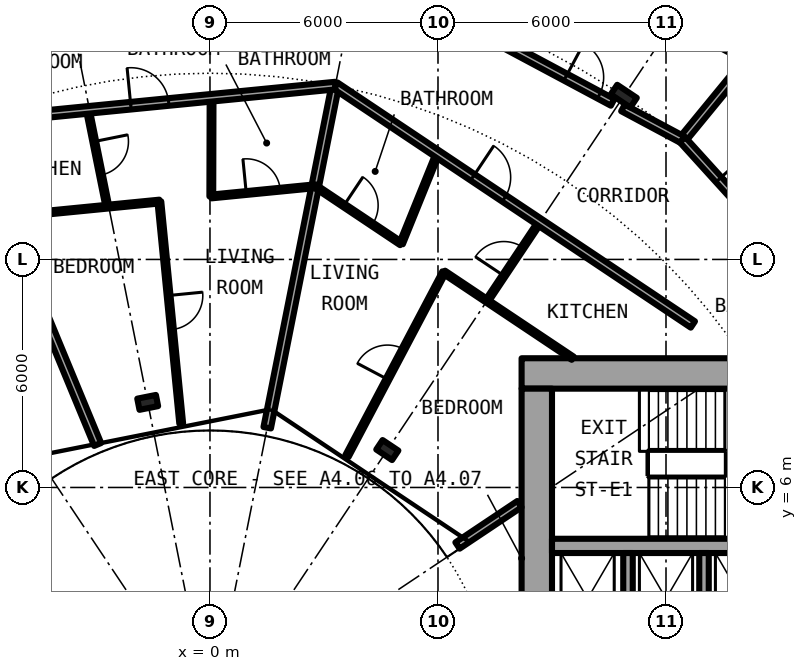
"""IFC4 building model, lengths in metres.
Left out: names, types, materials, properties, quantities, classifications, styles, units other than length and angle.
Written with IfcOpenShell. Run it as: python <this file> out.ifc"""

import sys

from ifc_helpers import new_model, si_unit, direction, frame, frame_2d, origin, origin_2d, place, context, subcontext, project, spatial, rectangle, i_section, extrude, element, fill, save


model = new_model("IFC4")
c1 = context("Model", 3, precision=1e-05, world=origin(), true_north=direction((0.0, 1.0)))
c2 = subcontext(c1, "Body", "Model", "MODEL_VIEW")
j1 = project(units=[si_unit("LENGTHUNIT", "METRE"), si_unit("PLANEANGLEUNIT", "RADIAN")], contexts=[c1])
p1 = place(None, origin())
s1 = spatial("IfcSite", under=j1, at=p1, CompositionType="ELEMENT")
p2 = place(p1, origin())
s2 = spatial("IfcBuilding", under=s1, at=p2, CompositionType="ELEMENT")
p3 = place(p2, frame((0.0, 0.0, 22.8)))
s3 = spatial("IfcBuildingStorey", under=s2, at=p3, CompositionType="ELEMENT", Elevation=22.8)
p4 = place(p3, frame((10.889, 16.297, 0.0), z_axis=(0.0, 0.0, 1.0), x_axis=(0.55557023302, 0.831469612303, 0.0)))
e1 = element("IfcColumn", 1, at=p4, inside=s3, PredefinedType="COLUMN", context=c2, shape_type="SweptSolid", body=[
    extrude(i_section(OverallWidth=0.305, OverallDepth=0.62, WebThickness=0.021, FlangeThickness=0.04, FilletRadius=0.027, at=origin_2d()), origin(), (0.0, 0.0, 1.0), 3.05),
])
for number, where, z_axis, x_axis in (
    (2, (4.667, 6.984, 0.0), (0.0, 0.0, 1.0), (0.556, 0.831, 0.0)),
    (3, (-1.639, 8.239, 0.0), (0.0, 0.0, 1.0), (-0.195, 0.981, 0.0)),
):
    element("IfcColumn", number, at=place(p3, frame(where, z_axis=z_axis, x_axis=x_axis)), inside=s3, PredefinedType="COLUMN", context=c2, shape_type="SweptSolid", body=[
        extrude(i_section(OverallWidth=0.3, OverallDepth=0.5, WebThickness=0.014, FlangeThickness=0.028, FilletRadius=0.027, at=origin_2d()), origin(), (0.0, 0.0, 1.0), 3.05),
    ])
p5 = place(p3, frame((22.4, 9.0, 0.0), z_axis=(0.0, 0.0, 1.0), x_axis=(-1.0, 0.0, 0.0)))
e4 = element("IfcWall", 4, at=p5, inside=s3, PredefinedType="SHEAR", context=c2, shape_type="SweptSolid", body=[
    extrude(rectangle(XDim=14.2, YDim=0.8, at=frame_2d((7.1, 0.0))), origin(), (0.0, 0.0, 1.0), 3.05),
])
p6 = place(p5, frame((1.325, 0.0, 0.0)))
e5 = element("IfcOpeningElement", 5, at=p6, cuts=e4, PredefinedType="OPENING", context=c2, shape_type="SweptSolid", body=[
    extrude(rectangle(XDim=1.2, YDim=2.3, at=frame_2d((0.6, 1.15))), frame((0.0, 0.41, 0.0), z_axis=(0.0, -1.0, 0.0), x_axis=(1.0, 0.0, 0.0)), (0.0, 0.0, 1.0), 0.82),
])
p7 = place(p3, frame((8.6, -8.6, 0.0), z_axis=(0.0, 0.0, 1.0), x_axis=(0.0, 1.0, 0.0)))
e6 = element("IfcWall", 6, at=p7, inside=s3, PredefinedType="SHEAR", context=c2, shape_type="SweptSolid", body=[
    extrude(rectangle(XDim=17.2, YDim=0.8, at=frame_2d((8.6, 0.0))), origin(), (0.0, 0.0, 1.0), 3.05),
])
p8 = place(p7, frame((7.4, 0.0, 0.1)))
e7 = element("IfcOpeningElement", 7, at=p8, cuts=e6, PredefinedType="OPENING", context=c2, shape_type="SweptSolid", body=[
    extrude(rectangle(XDim=2.4, YDim=2.2, at=frame_2d((1.2, 1.1))), frame((0.0, 0.41, 0.0), z_axis=(0.0, -1.0, 0.0), x_axis=(1.0, 0.0, 0.0)), (0.0, 0.0, 1.0), 0.82),
])
p9 = place(p3, frame((9.0, 4.462, 0.0), z_axis=(0.0, 0.0, 1.0), x_axis=(1.0, 0.0, 0.0)))
e8 = element("IfcWall", 8, at=p9, inside=s3, PredefinedType="SHEAR", context=c2, shape_type="SweptSolid", body=[
    extrude(rectangle(XDim=10.15, YDim=0.375, at=frame_2d((5.075, 0.0))), origin(), (0.0, 0.0, 1.0), 3.05),
])
p10 = place(p9, frame((6.6, 0.0, 0.0)))
e9 = element("IfcOpeningElement", 9, at=p10, cuts=e8, PredefinedType="OPENING", context=c2, shape_type="SweptSolid", body=[
    extrude(rectangle(XDim=1.1, YDim=2.3, at=frame_2d((0.55, 1.15))), frame((0.0, 0.198, 0.0), z_axis=(0.0, -1.0, 0.0), x_axis=(1.0, 0.0, 0.0)), (0.0, 0.0, 1.0), 0.395),
])
for number, where, z_axis, x_axis in (
    (10, (11.0, 1.825, 0.0), (0.0, 0.0, 1.0), (0.0, 1.0, 0.0)),
    (11, (13.0, 1.825, 0.0), (0.0, 0.0, 1.0), (0.0, 1.0, 0.0)),
):
    element("IfcWall", number, at=place(p3, frame(where, z_axis=z_axis, x_axis=x_axis)), inside=s3, PredefinedType="SOLIDWALL", context=c2, shape_type="SweptSolid", body=[
        extrude(rectangle(XDim=2.45, YDim=0.25, at=frame_2d((1.225, 0.0))), origin(), (0.0, 0.0, 1.0), 2.7),
    ])
p11 = place(p3, frame((-6.468, 15.614, 0.0), z_axis=(0.0, 0.0, 1.0), x_axis=(0.382518543471, -0.92394781449, 0.0)))
e12 = element("IfcWall", 12, at=p11, inside=s3, PredefinedType="PARTITIONING", context=c2, shape_type="SweptSolid", body=[
    extrude(rectangle(XDim=9.181, YDim=0.2, at=frame_2d((4.591, 0.0))), origin(), (0.0, 0.0, 1.0), 2.7),
])
p12 = place(p3, frame((-3.213, 15.934, 0.0), z_axis=(0.0, 0.0, 1.0), x_axis=(0.197851046463, -0.980232096706, 0.0)))
e13 = element("IfcWall", 13, at=p12, inside=s3, PredefinedType="PARTITIONING", context=c2, shape_type="SweptSolid", body=[
    extrude(rectangle(XDim=2.597, YDim=0.1, at=frame_2d((1.299, 0.0))), origin(), (0.0, 0.0, 1.0), 2.7),
])
p13 = place(p12, frame((0.849, 0.0, 0.0)))
e14 = element("IfcOpeningElement", 14, at=p13, cuts=e13, PredefinedType="OPENING", context=c2, shape_type="SweptSolid", body=[
    extrude(rectangle(XDim=0.9, YDim=2.3, at=frame_2d((0.45, 1.15))), frame((0.0, 0.06, 0.0), z_axis=(0.0, -1.0, 0.0), x_axis=(1.0, 0.0, 0.0)), (0.0, 0.0, 1.0), 0.12),
])
p14 = place(p3, frame((-1.332, 13.523, 0.0), z_axis=(0.0, 0.0, 1.0), x_axis=(0.097979463572, -0.995188436789, 0.0)))
e15 = element("IfcWall", 15, at=p14, inside=s3, PredefinedType="PARTITIONING", context=c2, shape_type="SweptSolid", body=[
    extrude(rectangle(XDim=5.868, YDim=0.1, at=frame_2d((2.934, 0.0))), origin(), (0.0, 0.0, 1.0), 2.7),
])
p15 = place(p14, frame((2.484, 0.0, 0.0)))
e16 = element("IfcOpeningElement", 16, at=p15, cuts=e15, PredefinedType="OPENING", context=c2, shape_type="SweptSolid", body=[
    extrude(rectangle(XDim=0.9, YDim=2.3, at=frame_2d((0.45, 1.15))), frame((0.0, 0.06, 0.0), z_axis=(0.0, -1.0, 0.0), x_axis=(1.0, 0.0, 0.0)), (0.0, 0.0, 1.0), 0.12),
])
p16 = place(p3, frame((0.035, 13.658, 0.0), z_axis=(0.0, 0.0, 1.0), x_axis=(0.00272632248, 0.999996283576, 0.0)))
e17 = element("IfcWall", 17, at=p16, inside=s3, PredefinedType="PARTITIONING", context=c2, shape_type="SweptSolid", body=[
    extrude(rectangle(XDim=2.597, YDim=0.1, at=frame_2d((1.298, 0.0))), origin(), (0.0, 0.0, 1.0), 2.7),
])
p17 = place(p3, frame((1.506, 7.572, 0.0), z_axis=(0.0, 0.0, 1.0), x_axis=(0.19511354088, 0.980780661598, 0.0)))
e18 = element("IfcWall", 18, at=p17, inside=s3, PredefinedType="PARTITIONING", context=c2, shape_type="SweptSolid", body=[
    extrude(rectangle(XDim=9.179, YDim=0.2, at=frame_2d((4.59, 0.0))), origin(), (0.0, 0.0, 1.0), 2.7),
])
p18 = place(p3, frame((3.605, 6.827, 0.0), z_axis=(0.0, 0.0, 1.0), x_axis=(0.466976820365, 0.884269556889, 0.0)))
e19 = element("IfcWall", 19, at=p18, inside=s3, PredefinedType="PARTITIONING", context=c2, shape_type="SweptSolid", body=[
    extrude(rectangle(XDim=5.469, YDim=0.1, at=frame_2d((2.735, 0.0))), origin(), (0.0, 0.0, 1.0), 2.7),
])
p19 = place(p18, frame((2.284, 0.0, 0.0)))
e20 = element("IfcOpeningElement", 20, at=p19, cuts=e19, PredefinedType="OPENING", context=c2, shape_type="SweptSolid", body=[
    extrude(rectangle(XDim=0.9, YDim=2.3, at=frame_2d((0.45, 1.15))), frame((0.0, 0.06, 0.0), z_axis=(0.0, -1.0, 0.0), x_axis=(1.0, 0.0, 0.0)), (0.0, 0.0, 1.0), 0.12),
])
p20 = place(p3, frame((5.029, 12.418, 0.0), z_axis=(0.0, 0.0, 1.0), x_axis=(0.375649498413, 0.926761811008, 0.0)))
e21 = element("IfcWall", 21, at=p20, inside=s3, PredefinedType="PARTITIONING", context=c2, shape_type="SweptSolid", body=[
    extrude(rectangle(XDim=2.548, YDim=0.1, at=frame_2d((1.274, 0.0))), origin(), (0.0, 0.0, 1.0), 2.7),
])
p21 = place(p3, frame((7.289, 10.908, 0.0), z_axis=(0.0, 0.0, 1.0), x_axis=(0.555355163998, 0.831613276602, 0.0)))
e22 = element("IfcWall", 22, at=p21, inside=s3, PredefinedType="PARTITIONING", context=c2, shape_type="SweptSolid", body=[
    extrude(rectangle(XDim=2.494, YDim=0.1, at=frame_2d((1.247, 0.0))), origin(), (0.0, 0.0, 1.0), 2.7),
])
p22 = place(p21, frame((0.797, 0.0, 0.0)))
e23 = element("IfcOpeningElement", 23, at=p22, cuts=e22, PredefinedType="OPENING", context=c2, shape_type="SweptSolid", body=[
    extrude(rectangle(XDim=0.9, YDim=2.3, at=frame_2d((0.45, 1.15))), frame((0.0, 0.06, 0.0), z_axis=(0.0, -1.0, 0.0), x_axis=(1.0, 0.0, 0.0)), (0.0, 0.0, 1.0), 0.12),
])
p23 = place(p3, frame((12.432, 15.152, 0.0), z_axis=(0.0, 0.0, 1.0), x_axis=(0.634353152115, 0.77304338714, 0.0)))
e24 = element("IfcWall", 24, at=p23, inside=s3, PredefinedType="PARTITIONING", context=c2, shape_type="SweptSolid", body=[
    extrude(rectangle(XDim=7.576, YDim=0.2, at=frame_2d((3.788, 0.0))), origin(), (0.0, 0.0, 1.0), 2.7),
])
p24 = place(p3, frame((6.513, 4.472, 0.0), z_axis=(0.0, 0.0, 1.0), x_axis=(0.831417956244, 0.555647533996, 0.0)))
e25 = element("IfcWall", 25, at=p24, inside=s3, PredefinedType="PARTITIONING", context=c2, shape_type="SweptSolid", body=[
    extrude(rectangle(XDim=1.962, YDim=0.2, at=frame_2d((0.981, 0.0))), origin(), (0.0, 0.0, 1.0), 2.7),
])
p25 = place(p3, frame((2.771, 13.926, 0.0), z_axis=(0.0, 0.0, 1.0), x_axis=(0.831538390496, -0.555467285384, 0.0)))
e26 = element("IfcWall", 26, at=p25, inside=s3, PredefinedType="PARTITIONING", context=c2, shape_type="SweptSolid", body=[
    extrude(rectangle(XDim=2.717, YDim=0.1, at=frame_2d((1.358, 0.0))), origin(), (0.0, 0.0, 1.0), 2.7),
])
p26 = place(p25, frame((0.907, 0.0, 0.0)))
e27 = element("IfcOpeningElement", 27, at=p26, cuts=e26, PredefinedType="OPENING", context=c2, shape_type="SweptSolid", body=[
    extrude(rectangle(XDim=0.9, YDim=2.3, at=frame_2d((0.45, 1.15))), frame((0.0, 0.06, 0.0), z_axis=(0.0, -1.0, 0.0), x_axis=(1.0, 0.0, 0.0)), (0.0, 0.0, 1.0), 0.12),
])
p27 = place(p3, frame((6.159, 11.663, 0.0), z_axis=(0.0, 0.0, 1.0), x_axis=(0.831459707426, -0.555585056429, 0.0)))
e28 = element("IfcWall", 28, at=p27, inside=s3, PredefinedType="PARTITIONING", context=c2, shape_type="SweptSolid", body=[
    extrude(rectangle(XDim=4.073, YDim=0.1, at=frame_2d((2.037, 0.0))), origin(), (0.0, 0.0, 1.0), 2.7),
])
p28 = place(p3, frame((-5.434, 13.119, 0.0), z_axis=(0.0, 0.0, 1.0), x_axis=(0.995195804672, 0.097904598272, 0.0)))
e29 = element("IfcWall", 29, at=p28, inside=s3, PredefinedType="PARTITIONING", context=c2, shape_type="SweptSolid", body=[
    extrude(rectangle(XDim=4.127, YDim=0.1, at=frame_2d((2.063, 0.0))), origin(), (0.0, 0.0, 1.0), 2.7),
])
p29 = place(p3, frame((0.035, 13.657, 0.0), z_axis=(0.0, 0.0, 1.0), x_axis=(0.995196843386, 0.097894039223, 0.0)))
e30 = element("IfcWall", 30, at=p29, inside=s3, PredefinedType="PARTITIONING", context=c2, shape_type="SweptSolid", body=[
    extrude(rectangle(XDim=2.748, YDim=0.1, at=frame_2d((1.374, 0.0))), origin(), (0.0, 0.0, 1.0), 2.7),
])
p30 = place(p29, frame((0.924, 0.0, 0.0)))
e31 = element("IfcOpeningElement", 31, at=p30, cuts=e30, PredefinedType="OPENING", context=c2, shape_type="SweptSolid", body=[
    extrude(rectangle(XDim=0.9, YDim=2.3, at=frame_2d((0.45, 1.15))), frame((0.0, 0.06, 0.0), z_axis=(0.0, -1.0, 0.0), x_axis=(1.0, 0.0, 0.0)), (0.0, 0.0, 1.0), 0.12),
])
p31 = place(p3, frame((3.299, 16.574, 0.0), z_axis=(0.0, 0.0, 1.0), x_axis=(0.831482209042, -0.555551380205, 0.0)))
e32 = element("IfcWall", 32, at=p31, inside=s3, PredefinedType="PARTITIONING", context=c2, shape_type="SweptSolid", body=[
    extrude(rectangle(XDim=11.315, YDim=0.2, at=frame_2d((5.657, 0.0))), origin(), (0.0, 0.0, 1.0), 2.7),
])
p32 = place(p31, frame((4.346, 0.0, 0.0)))
e33 = element("IfcOpeningElement", 33, at=p32, cuts=e32, PredefinedType="OPENING", context=c2, shape_type="SweptSolid", body=[
    extrude(rectangle(XDim=1.0, YDim=2.3, at=frame_2d((0.5, 1.15))), frame((0.0, 0.11, 0.0), z_axis=(0.0, -1.0, 0.0), x_axis=(1.0, 0.0, 0.0)), (0.0, 0.0, 1.0), 0.22),
])
p33 = place(p3, frame((-6.467, 15.614, 0.0), z_axis=(0.0, 0.0, 1.0), x_axis=(0.995201860711, 0.097843019361, 0.0)))
e34 = element("IfcWall", 34, at=p33, inside=s3, PredefinedType="PARTITIONING", context=c2, shape_type="SweptSolid", body=[
    extrude(rectangle(XDim=9.811, YDim=0.2, at=frame_2d((4.906, 0.0))), origin(), (0.0, 0.0, 1.0), 2.7),
])
p34 = place(p33, frame((4.405, 0.0, 0.0)))
e35 = element("IfcOpeningElement", 35, at=p34, cuts=e34, PredefinedType="OPENING", context=c2, shape_type="SweptSolid", body=[
    extrude(rectangle(XDim=1.0, YDim=2.3, at=frame_2d((0.5, 1.15))), frame((0.0, 0.11, 0.0), z_axis=(0.0, -1.0, 0.0), x_axis=(1.0, 0.0, 0.0)), (0.0, 0.0, 1.0), 0.22),
])
p35 = place(p3, frame((5.69, 18.756, 0.0), z_axis=(0.0, 0.0, 1.0), x_axis=(0.881866548297, -0.471499089072, 0.0)))
e36 = element("IfcWall", 36, at=p35, inside=s3, PredefinedType="PARTITIONING", context=c2, shape_type="SweptSolid", body=[
    extrude(rectangle(XDim=5.563, YDim=0.2, at=frame_2d((2.782, 0.0))), origin(), (0.0, 0.0, 1.0), 2.38),
])
p36 = place(p35, frame((4.161, 0.0, 0.0)))
e37 = element("IfcOpeningElement", 37, at=p36, cuts=e36, PredefinedType="OPENING", context=c2, shape_type="SweptSolid", body=[
    extrude(rectangle(XDim=1.0, YDim=2.3, at=frame_2d((0.5, 1.15))), frame((0.0, 0.11, 0.0), z_axis=(0.0, -1.0, 0.0), x_axis=(1.0, 0.0, 0.0)), (0.0, 0.0, 1.0), 0.22),
])
p37 = place(p3, frame((10.867, 15.989, 0.0), z_axis=(0.0, 0.0, 1.0), x_axis=(0.88180855718, -0.471607536501, 0.0)))
e38 = element("IfcWall", 38, at=p37, inside=s3, PredefinedType="PARTITIONING", context=c2, shape_type="SweptSolid", body=[
    extrude(rectangle(XDim=1.777, YDim=0.2, at=frame_2d((0.889, 0.0))), origin(), (0.0, 0.0, 1.0), 2.38),
])
p38 = place(p3, frame((12.434, 15.151, 0.0), z_axis=(0.0, 0.0, 1.0), x_axis=(0.671514934772, -0.740991020444, 0.0)))
e39 = element("IfcWall", 39, at=p38, inside=s3, PredefinedType="PARTITIONING", context=c2, shape_type="SweptSolid", body=[
    extrude(rectangle(XDim=5.598, YDim=0.2, at=frame_2d((2.799, 0.0))), origin(), (0.0, 0.0, 1.0), 2.38),
])
p39 = place(p38, frame((1.417, 0.0, 0.0)))
e40 = element("IfcOpeningElement", 40, at=p39, cuts=e39, PredefinedType="OPENING", context=c2, shape_type="SweptSolid", body=[
    extrude(rectangle(XDim=1.0, YDim=2.3, at=frame_2d((0.5, 1.15))), frame((0.0, 0.11, 0.0), z_axis=(0.0, -1.0, 0.0), x_axis=(1.0, 0.0, 0.0)), (0.0, 0.0, 1.0), 0.22),
])
p40 = place(p3, frame((10.312, 19.288, 0.0), z_axis=(0.0, 0.0, 1.0), x_axis=(0.881763472003, -0.471691826769, 0.0)))
e41 = element("IfcWall", 41, at=p40, inside=s3, PredefinedType="PARTITIONING", context=c2, shape_type="SweptSolid", body=[
    extrude(rectangle(XDim=4.35, YDim=0.1, at=frame_2d((2.175, 0.0))), origin(), (0.0, 0.0, 1.0), 2.7),
])
p41 = place(p40, frame((2.811, 0.0, 0.0)))
e42 = element("IfcOpeningElement", 42, at=p41, cuts=e41, PredefinedType="OPENING", context=c2, shape_type="SweptSolid", body=[
    extrude(rectangle(XDim=0.9, YDim=2.3, at=frame_2d((0.45, 1.15))), frame((0.0, 0.06, 0.0), z_axis=(0.0, -1.0, 0.0), x_axis=(1.0, 0.0, 0.0)), (0.0, 0.0, 1.0), 0.12),
])
p42 = place(p39, origin())
e43 = element("IfcDoor", 43, at=p42, inside=s3, OperationType="SINGLE_SWING_LEFT", PredefinedType="DOOR", context=c2, shape_type="SweptSolid", body=[
    extrude(rectangle(XDim=1.0, YDim=2.3, at=frame_2d((0.5, 1.15))), frame((0.0, 0.025, 0.0), z_axis=(0.0, -1.0, 0.0), x_axis=(1.0, 0.0, 0.0)), (0.0, 0.0, 1.0), 0.05),
])
fill(e40, e43)
p43 = place(p36, origin())
e44 = element("IfcDoor", 44, at=p43, inside=s3, OperationType="SINGLE_SWING_RIGHT", PredefinedType="DOOR", context=c2, shape_type="SweptSolid", body=[
    extrude(rectangle(XDim=1.0, YDim=2.3, at=frame_2d((0.5, 1.15))), frame((0.0, 0.025, 0.0), z_axis=(0.0, -1.0, 0.0), x_axis=(1.0, 0.0, 0.0)), (0.0, 0.0, 1.0), 0.05),
])
fill(e37, e44)
p44 = place(p32, origin())
e45 = element("IfcDoor", 45, at=p44, inside=s3, OperationType="SINGLE_SWING_LEFT", PredefinedType="DOOR", context=c2, shape_type="SweptSolid", body=[
    extrude(rectangle(XDim=1.0, YDim=2.3, at=frame_2d((0.5, 1.15))), frame((0.0, 0.025, 0.0), z_axis=(0.0, -1.0, 0.0), x_axis=(1.0, 0.0, 0.0)), (0.0, 0.0, 1.0), 0.05),
])
fill(e33, e45)
p45 = place(p26, origin())
e46 = element("IfcDoor", 46, at=p45, inside=s3, OperationType="SINGLE_SWING_LEFT", PredefinedType="DOOR", context=c2, shape_type="SweptSolid", body=[
    extrude(rectangle(XDim=0.9, YDim=2.3, at=frame_2d((0.45, 1.15))), frame((0.0, 0.025, 0.0), z_axis=(0.0, -1.0, 0.0), x_axis=(1.0, 0.0, 0.0)), (0.0, 0.0, 1.0), 0.05),
])
fill(e27, e46)
p46 = place(p22, origin())
e47 = element("IfcDoor", 47, at=p46, inside=s3, OperationType="SINGLE_SWING_RIGHT", PredefinedType="DOOR", context=c2, shape_type="SweptSolid", body=[
    extrude(rectangle(XDim=0.9, YDim=2.3, at=frame_2d((0.45, 1.15))), frame((0.0, 0.025, 0.0), z_axis=(0.0, -1.0, 0.0), x_axis=(1.0, 0.0, 0.0)), (0.0, 0.0, 1.0), 0.05),
])
fill(e23, e47)
p47 = place(p19, origin())
e48 = element("IfcDoor", 48, at=p47, inside=s3, OperationType="SINGLE_SWING_RIGHT", PredefinedType="DOOR", context=c2, shape_type="SweptSolid", body=[
    extrude(rectangle(XDim=0.9, YDim=2.3, at=frame_2d((0.45, 1.15))), frame((0.0, 0.025, 0.0), z_axis=(0.0, -1.0, 0.0), x_axis=(1.0, 0.0, 0.0)), (0.0, 0.0, 1.0), 0.05),
])
fill(e20, e48)
p48 = place(p34, origin())
e49 = element("IfcDoor", 49, at=p48, inside=s3, OperationType="SINGLE_SWING_LEFT", PredefinedType="DOOR", context=c2, shape_type="SweptSolid", body=[
    extrude(rectangle(XDim=1.0, YDim=2.3, at=frame_2d((0.5, 1.15))), frame((0.0, 0.025, 0.0), z_axis=(0.0, -1.0, 0.0), x_axis=(1.0, 0.0, 0.0)), (0.0, 0.0, 1.0), 0.05),
])
fill(e35, e49)
p49 = place(p30, origin())
e50 = element("IfcDoor", 50, at=p49, inside=s3, OperationType="SINGLE_SWING_RIGHT", PredefinedType="DOOR", context=c2, shape_type="SweptSolid", body=[
    extrude(rectangle(XDim=0.9, YDim=2.3, at=frame_2d((0.45, 1.15))), frame((0.0, 0.025, 0.0), z_axis=(0.0, -1.0, 0.0), x_axis=(1.0, 0.0, 0.0)), (0.0, 0.0, 1.0), 0.05),
])
fill(e31, e50)
p50 = place(p13, origin())
e51 = element("IfcDoor", 51, at=p50, inside=s3, OperationType="SINGLE_SWING_RIGHT", PredefinedType="DOOR", context=c2, shape_type="SweptSolid", body=[
    extrude(rectangle(XDim=0.9, YDim=2.3, at=frame_2d((0.45, 1.15))), frame((0.0, 0.025, 0.0), z_axis=(0.0, -1.0, 0.0), x_axis=(1.0, 0.0, 0.0)), (0.0, 0.0, 1.0), 0.05),
])
fill(e14, e51)
p51 = place(p15, origin())
e52 = element("IfcDoor", 52, at=p51, inside=s3, OperationType="SINGLE_SWING_RIGHT", PredefinedType="DOOR", context=c2, shape_type="SweptSolid", body=[
    extrude(rectangle(XDim=0.9, YDim=2.3, at=frame_2d((0.45, 1.15))), frame((0.0, 0.025, 0.0), z_axis=(0.0, -1.0, 0.0), x_axis=(1.0, 0.0, 0.0)), (0.0, 0.0, 1.0), 0.05),
])
fill(e16, e52)
save(model, sys.argv[1])
